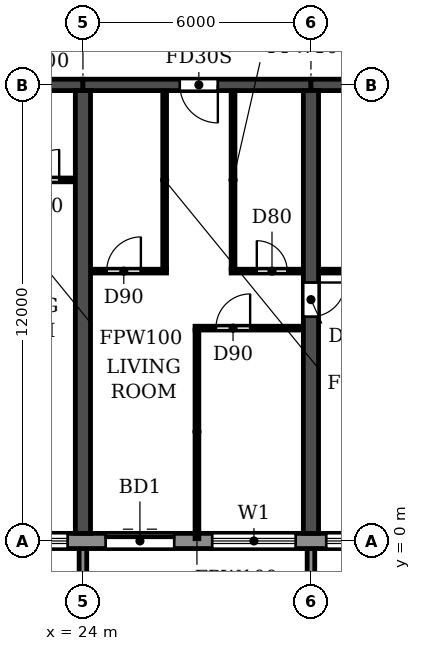
"""IFC4 building model, lengths in metres.
Left out: names, types, materials, properties, quantities, classifications, styles, units other than length and angle.
Written with IfcOpenShell. Run it as: python <this file> out.ifc"""

import sys

from ifc_helpers import new_model, si_unit, direction, frame, frame_2d, origin, place, context, subcontext, project, spatial, polyline, rectangle, outline, extrude, source, transform, mapped, element, fill, save


model = new_model("IFC4")
c1 = context("Model", 3, precision=1e-05, world=origin(), true_north=direction((0.0, 1.0)))
c2 = subcontext(c1, "Body", "Model", "MODEL_VIEW")
j1 = project(units=[si_unit("LENGTHUNIT", "METRE"), si_unit("PLANEANGLEUNIT", "RADIAN")], contexts=[c1])
p1 = place(None, origin())
s1 = spatial("IfcSite", under=j1, at=p1, CompositionType="ELEMENT")
p2 = place(p1, origin())
s2 = spatial("IfcBuilding", under=s1, at=p2, CompositionType="ELEMENT")
p3 = place(p2, frame((0.0, 0.0, 23.4)))
s3 = spatial("IfcBuildingStorey", under=s2, at=p3, CompositionType="ELEMENT", Elevation=23.4)
p4 = place(p3, frame((24.0, 0.2, 0.0), z_axis=(0.0, 0.0, 1.0), x_axis=(0.0, 1.0, 0.0)))
e1 = element("IfcWall", 1, at=p4, inside=s3, PredefinedType="SHEAR", context=c2, shape_type="SweptSolid", body=[
    extrude(rectangle(XDim=11.65, YDim=0.4, at=frame_2d((5.825, 0.0))), origin(), (0.0, 0.0, 1.0), 3.05),
])
p5 = place(p3, frame((30.0, 0.2, 0.0), z_axis=(0.0, 0.0, 1.0), x_axis=(0.0, 1.0, 0.0)))
e2 = element("IfcWall", 2, at=p5, inside=s3, PredefinedType="SHEAR", context=c2, shape_type="SweptSolid", body=[
    extrude(rectangle(XDim=11.65, YDim=0.4, at=frame_2d((5.825, 0.0))), origin(), (0.0, 0.0, 1.0), 3.05),
])
p6 = place(p5, frame((5.7, 0.0, 0.0)))
e3 = element("IfcOpeningElement", 3, at=p6, cuts=e2, PredefinedType="OPENING", context=c2, shape_type="SweptSolid", body=[
    extrude(rectangle(XDim=0.9, YDim=2.1, at=frame_2d((0.45, 1.05))), frame((0.0, 0.21, 0.0), z_axis=(0.0, -1.0, 0.0), x_axis=(1.0, 0.0, 0.0)), (0.0, 0.0, 1.0), 0.42),
])
p7 = place(p3, frame((18.0, 12.0, 0.0), z_axis=(0.0, 0.0, 1.0), x_axis=(1.0, 0.0, 0.0)))
e4 = element("IfcWall", 4, at=p7, inside=s3, PredefinedType="SHEAR", context=c2, shape_type="SweptSolid", body=[
    extrude(rectangle(XDim=6.0, YDim=0.3, at=frame_2d((3.0, 0.0))), origin(), (0.0, 0.0, 1.0), 2.45),
])
p8 = place(p7, frame((2.55, 0.0, 0.0)))
e5 = element("IfcOpeningElement", 5, at=p8, cuts=e4, PredefinedType="OPENING", context=c2, shape_type="SweptSolid", body=[
    extrude(rectangle(XDim=1.0, YDim=2.1, at=frame_2d((0.5, 1.05))), frame((0.0, 0.16, 0.0), z_axis=(0.0, -1.0, 0.0), x_axis=(1.0, 0.0, 0.0)), (0.0, 0.0, 1.0), 0.32),
])
p9 = place(p3, frame((24.0, 12.0, 0.0), z_axis=(0.0, 0.0, 1.0), x_axis=(1.0, 0.0, 0.0)))
e6 = element("IfcWall", 6, at=p9, inside=s3, PredefinedType="SHEAR", context=c2, shape_type="SweptSolid", body=[
    extrude(rectangle(XDim=6.0, YDim=0.3, at=frame_2d((3.0, 0.0))), origin(), (0.0, 0.0, 1.0), 2.45),
])
p10 = place(p9, frame((2.55, 0.0, 0.0)))
e7 = element("IfcOpeningElement", 7, at=p10, cuts=e6, PredefinedType="OPENING", context=c2, shape_type="SweptSolid", body=[
    extrude(rectangle(XDim=1.0, YDim=2.1, at=frame_2d((0.5, 1.05))), frame((0.0, 0.16, 0.0), z_axis=(0.0, -1.0, 0.0), x_axis=(1.0, 0.0, 0.0)), (0.0, 0.0, 1.0), 0.32),
])
p11 = place(p3, frame((30.0, 12.0, 0.0), z_axis=(0.0, 0.0, 1.0), x_axis=(1.0, 0.0, 0.0)))
e8 = element("IfcWall", 8, at=p11, inside=s3, PredefinedType="SHEAR", context=c2, shape_type="SweptSolid", body=[
    extrude(rectangle(XDim=6.0, YDim=0.3, at=frame_2d((3.0, 0.0))), origin(), (0.0, 0.0, 1.0), 2.45),
])
p12 = place(p3, frame((4.683, 0.0, 0.0), z_axis=(0.0, 0.0, 1.0), x_axis=(1.0, 0.0, 0.0)))
e9 = element("IfcWall", 9, at=p12, inside=s3, PredefinedType="STANDARD", context=c2, shape_type="SweptSolid", body=[
    extrude(rectangle(XDim=92.634, YDim=0.4, at=frame_2d((46.317, 0.0))), origin(), (0.0, 0.0, 1.0), 3.05),
])
p13 = place(p12, frame((1.717, 0.0, 0.9)))
e10 = element("IfcOpeningElement", 10, at=p13, cuts=e9, PredefinedType="OPENING", context=c2, shape_type="SweptSolid", body=[
    extrude(rectangle(XDim=2.2, YDim=1.5, at=frame_2d((1.1, 0.75))), frame((0.0, 0.21, 0.0), z_axis=(0.0, -1.0, 0.0), x_axis=(1.0, 0.0, 0.0)), (0.0, 0.0, 1.0), 0.42),
])
p14 = place(p12, frame((4.717, 0.0, 0.9)))
e11 = element("IfcOpeningElement", 11, at=p14, cuts=e9, PredefinedType="OPENING", context=c2, shape_type="SweptSolid", body=[
    extrude(rectangle(XDim=2.2, YDim=1.5, at=frame_2d((1.1, 0.75))), frame((0.0, 0.21, 0.0), z_axis=(0.0, -1.0, 0.0), x_axis=(1.0, 0.0, 0.0)), (0.0, 0.0, 1.0), 0.42),
])
p15 = place(p12, frame((7.717, 0.0, 0.9)))
e12 = element("IfcOpeningElement", 12, at=p15, cuts=e9, PredefinedType="OPENING", context=c2, shape_type="SweptSolid", body=[
    extrude(rectangle(XDim=2.2, YDim=1.5, at=frame_2d((1.1, 0.75))), frame((0.0, 0.21, 0.0), z_axis=(0.0, -1.0, 0.0), x_axis=(1.0, 0.0, 0.0)), (0.0, 0.0, 1.0), 0.42),
])
p16 = place(p12, frame((10.717, 0.0, 0.9)))
e13 = element("IfcOpeningElement", 13, at=p16, cuts=e9, PredefinedType="OPENING", context=c2, shape_type="SweptSolid", body=[
    extrude(rectangle(XDim=2.2, YDim=1.5, at=frame_2d((1.1, 0.75))), frame((0.0, 0.21, 0.0), z_axis=(0.0, -1.0, 0.0), x_axis=(1.0, 0.0, 0.0)), (0.0, 0.0, 1.0), 0.42),
])
p17 = place(p12, frame((13.717, 0.0, 0.9)))
e14 = element("IfcOpeningElement", 14, at=p17, cuts=e9, PredefinedType="OPENING", context=c2, shape_type="SweptSolid", body=[
    extrude(rectangle(XDim=2.2, YDim=1.5, at=frame_2d((1.1, 0.75))), frame((0.0, 0.21, 0.0), z_axis=(0.0, -1.0, 0.0), x_axis=(1.0, 0.0, 0.0)), (0.0, 0.0, 1.0), 0.42),
])
p18 = place(p12, frame((16.717, 0.0, 0.9)))
e15 = element("IfcOpeningElement", 15, at=p18, cuts=e9, PredefinedType="OPENING", context=c2, shape_type="SweptSolid", body=[
    extrude(rectangle(XDim=2.2, YDim=1.5, at=frame_2d((1.1, 0.75))), frame((0.0, 0.21, 0.0), z_axis=(0.0, -1.0, 0.0), x_axis=(1.0, 0.0, 0.0)), (0.0, 0.0, 1.0), 0.42),
])
p19 = place(p12, frame((19.917, 0.0, 0.0)))
e16 = element("IfcOpeningElement", 16, at=p19, cuts=e9, PredefinedType="OPENING", context=c2, shape_type="SweptSolid", body=[
    extrude(rectangle(XDim=1.8, YDim=2.4, at=frame_2d((0.9, 1.2))), frame((0.0, 0.21, 0.0), z_axis=(0.0, -1.0, 0.0), x_axis=(1.0, 0.0, 0.0)), (0.0, 0.0, 1.0), 0.42),
])
p20 = place(p12, frame((22.717, 0.0, 0.9)))
e17 = element("IfcOpeningElement", 17, at=p20, cuts=e9, PredefinedType="OPENING", context=c2, shape_type="SweptSolid", body=[
    extrude(rectangle(XDim=2.2, YDim=1.5, at=frame_2d((1.1, 0.75))), frame((0.0, 0.21, 0.0), z_axis=(0.0, -1.0, 0.0), x_axis=(1.0, 0.0, 0.0)), (0.0, 0.0, 1.0), 0.42),
])
p21 = place(p12, frame((25.717, 0.0, 0.9)))
e18 = element("IfcOpeningElement", 18, at=p21, cuts=e9, PredefinedType="OPENING", context=c2, shape_type="SweptSolid", body=[
    extrude(rectangle(XDim=2.2, YDim=1.5, at=frame_2d((1.1, 0.75))), frame((0.0, 0.21, 0.0), z_axis=(0.0, -1.0, 0.0), x_axis=(1.0, 0.0, 0.0)), (0.0, 0.0, 1.0), 0.42),
])
p22 = place(p12, frame((28.717, 0.0, 0.9)))
e19 = element("IfcOpeningElement", 19, at=p22, cuts=e9, PredefinedType="OPENING", context=c2, shape_type="SweptSolid", body=[
    extrude(rectangle(XDim=2.2, YDim=1.5, at=frame_2d((1.1, 0.75))), frame((0.0, 0.21, 0.0), z_axis=(0.0, -1.0, 0.0), x_axis=(1.0, 0.0, 0.0)), (0.0, 0.0, 1.0), 0.42),
])
p23 = place(p12, frame((31.917, 0.0, 0.0)))
e20 = element("IfcOpeningElement", 20, at=p23, cuts=e9, PredefinedType="OPENING", context=c2, shape_type="SweptSolid", body=[
    extrude(rectangle(XDim=1.8, YDim=2.4, at=frame_2d((0.9, 1.2))), frame((0.0, 0.21, 0.0), z_axis=(0.0, -1.0, 0.0), x_axis=(1.0, 0.0, 0.0)), (0.0, 0.0, 1.0), 0.42),
])
p24 = place(p12, frame((34.717, 0.0, 0.9)))
e21 = element("IfcOpeningElement", 21, at=p24, cuts=e9, PredefinedType="OPENING", context=c2, shape_type="SweptSolid", body=[
    extrude(rectangle(XDim=2.2, YDim=1.5, at=frame_2d((1.1, 0.75))), frame((0.0, 0.21, 0.0), z_axis=(0.0, -1.0, 0.0), x_axis=(1.0, 0.0, 0.0)), (0.0, 0.0, 1.0), 0.42),
])
p25 = place(p12, frame((37.717, 0.0, 0.9)))
e22 = element("IfcOpeningElement", 22, at=p25, cuts=e9, PredefinedType="OPENING", context=c2, shape_type="SweptSolid", body=[
    extrude(rectangle(XDim=2.2, YDim=1.5, at=frame_2d((1.1, 0.75))), frame((0.0, 0.21, 0.0), z_axis=(0.0, -1.0, 0.0), x_axis=(1.0, 0.0, 0.0)), (0.0, 0.0, 1.0), 0.42),
])
p26 = place(p12, frame((40.717, 0.0, 0.9)))
e23 = element("IfcOpeningElement", 23, at=p26, cuts=e9, PredefinedType="OPENING", context=c2, shape_type="SweptSolid", body=[
    extrude(rectangle(XDim=2.2, YDim=1.5, at=frame_2d((1.1, 0.75))), frame((0.0, 0.21, 0.0), z_axis=(0.0, -1.0, 0.0), x_axis=(1.0, 0.0, 0.0)), (0.0, 0.0, 1.0), 0.42),
])
p27 = place(p12, frame((43.917, 0.0, 0.0)))
e24 = element("IfcOpeningElement", 24, at=p27, cuts=e9, PredefinedType="OPENING", context=c2, shape_type="SweptSolid", body=[
    extrude(rectangle(XDim=1.8, YDim=2.4, at=frame_2d((0.9, 1.2))), frame((0.0, 0.21, 0.0), z_axis=(0.0, -1.0, 0.0), x_axis=(1.0, 0.0, 0.0)), (0.0, 0.0, 1.0), 0.42),
])
p28 = place(p12, frame((46.717, 0.0, 0.9)))
e25 = element("IfcOpeningElement", 25, at=p28, cuts=e9, PredefinedType="OPENING", context=c2, shape_type="SweptSolid", body=[
    extrude(rectangle(XDim=2.2, YDim=1.5, at=frame_2d((1.1, 0.75))), frame((0.0, 0.21, 0.0), z_axis=(0.0, -1.0, 0.0), x_axis=(1.0, 0.0, 0.0)), (0.0, 0.0, 1.0), 0.42),
])
p29 = place(p12, frame((49.717, 0.0, 0.9)))
e26 = element("IfcOpeningElement", 26, at=p29, cuts=e9, PredefinedType="OPENING", context=c2, shape_type="SweptSolid", body=[
    extrude(rectangle(XDim=2.2, YDim=1.5, at=frame_2d((1.1, 0.75))), frame((0.0, 0.21, 0.0), z_axis=(0.0, -1.0, 0.0), x_axis=(1.0, 0.0, 0.0)), (0.0, 0.0, 1.0), 0.42),
])
p30 = place(p12, frame((52.717, 0.0, 0.9)))
e27 = element("IfcOpeningElement", 27, at=p30, cuts=e9, PredefinedType="OPENING", context=c2, shape_type="SweptSolid", body=[
    extrude(rectangle(XDim=2.2, YDim=1.5, at=frame_2d((1.1, 0.75))), frame((0.0, 0.21, 0.0), z_axis=(0.0, -1.0, 0.0), x_axis=(1.0, 0.0, 0.0)), (0.0, 0.0, 1.0), 0.42),
])
p31 = place(p12, frame((55.717, 0.0, 0.9)))
e28 = element("IfcOpeningElement", 28, at=p31, cuts=e9, PredefinedType="OPENING", context=c2, shape_type="SweptSolid", body=[
    extrude(rectangle(XDim=2.2, YDim=1.5, at=frame_2d((1.1, 0.75))), frame((0.0, 0.21, 0.0), z_axis=(0.0, -1.0, 0.0), x_axis=(1.0, 0.0, 0.0)), (0.0, 0.0, 1.0), 0.42),
])
p32 = place(p12, frame((58.917, 0.0, 0.0)))
e29 = element("IfcOpeningElement", 29, at=p32, cuts=e9, PredefinedType="OPENING", context=c2, shape_type="SweptSolid", body=[
    extrude(rectangle(XDim=1.8, YDim=2.4, at=frame_2d((0.9, 1.2))), frame((0.0, 0.21, 0.0), z_axis=(0.0, -1.0, 0.0), x_axis=(1.0, 0.0, 0.0)), (0.0, 0.0, 1.0), 0.42),
])
p33 = place(p12, frame((61.717, 0.0, 0.9)))
e30 = element("IfcOpeningElement", 30, at=p33, cuts=e9, PredefinedType="OPENING", context=c2, shape_type="SweptSolid", body=[
    extrude(rectangle(XDim=2.2, YDim=1.5, at=frame_2d((1.1, 0.75))), frame((0.0, 0.21, 0.0), z_axis=(0.0, -1.0, 0.0), x_axis=(1.0, 0.0, 0.0)), (0.0, 0.0, 1.0), 0.42),
])
p34 = place(p12, frame((64.717, 0.0, 0.9)))
e31 = element("IfcOpeningElement", 31, at=p34, cuts=e9, PredefinedType="OPENING", context=c2, shape_type="SweptSolid", body=[
    extrude(rectangle(XDim=2.2, YDim=1.5, at=frame_2d((1.1, 0.75))), frame((0.0, 0.21, 0.0), z_axis=(0.0, -1.0, 0.0), x_axis=(1.0, 0.0, 0.0)), (0.0, 0.0, 1.0), 0.42),
])
p35 = place(p12, frame((67.717, 0.0, 0.9)))
e32 = element("IfcOpeningElement", 32, at=p35, cuts=e9, PredefinedType="OPENING", context=c2, shape_type="SweptSolid", body=[
    extrude(rectangle(XDim=2.2, YDim=1.5, at=frame_2d((1.1, 0.75))), frame((0.0, 0.21, 0.0), z_axis=(0.0, -1.0, 0.0), x_axis=(1.0, 0.0, 0.0)), (0.0, 0.0, 1.0), 0.42),
])
p36 = place(p12, frame((70.917, 0.0, 0.0)))
e33 = element("IfcOpeningElement", 33, at=p36, cuts=e9, PredefinedType="OPENING", context=c2, shape_type="SweptSolid", body=[
    extrude(rectangle(XDim=1.8, YDim=2.4, at=frame_2d((0.9, 1.2))), frame((0.0, 0.21, 0.0), z_axis=(0.0, -1.0, 0.0), x_axis=(1.0, 0.0, 0.0)), (0.0, 0.0, 1.0), 0.42),
])
p37 = place(p12, frame((73.717, 0.0, 0.9)))
e34 = element("IfcOpeningElement", 34, at=p37, cuts=e9, PredefinedType="OPENING", context=c2, shape_type="SweptSolid", body=[
    extrude(rectangle(XDim=2.2, YDim=1.5, at=frame_2d((1.1, 0.75))), frame((0.0, 0.21, 0.0), z_axis=(0.0, -1.0, 0.0), x_axis=(1.0, 0.0, 0.0)), (0.0, 0.0, 1.0), 0.42),
])
p38 = place(p12, frame((76.717, 0.0, 0.9)))
e35 = element("IfcOpeningElement", 35, at=p38, cuts=e9, PredefinedType="OPENING", context=c2, shape_type="SweptSolid", body=[
    extrude(rectangle(XDim=2.2, YDim=1.5, at=frame_2d((1.1, 0.75))), frame((0.0, 0.21, 0.0), z_axis=(0.0, -1.0, 0.0), x_axis=(1.0, 0.0, 0.0)), (0.0, 0.0, 1.0), 0.42),
])
p39 = place(p12, frame((79.717, 0.0, 0.9)))
e36 = element("IfcOpeningElement", 36, at=p39, cuts=e9, PredefinedType="OPENING", context=c2, shape_type="SweptSolid", body=[
    extrude(rectangle(XDim=2.2, YDim=1.5, at=frame_2d((1.1, 0.75))), frame((0.0, 0.21, 0.0), z_axis=(0.0, -1.0, 0.0), x_axis=(1.0, 0.0, 0.0)), (0.0, 0.0, 1.0), 0.42),
])
p40 = place(p12, frame((82.717, 0.0, 0.9)))
e37 = element("IfcOpeningElement", 37, at=p40, cuts=e9, PredefinedType="OPENING", context=c2, shape_type="SweptSolid", body=[
    extrude(rectangle(XDim=2.2, YDim=1.5, at=frame_2d((1.1, 0.75))), frame((0.0, 0.21, 0.0), z_axis=(0.0, -1.0, 0.0), x_axis=(1.0, 0.0, 0.0)), (0.0, 0.0, 1.0), 0.42),
])
p41 = place(p12, frame((85.717, 0.0, 0.9)))
e38 = element("IfcOpeningElement", 38, at=p41, cuts=e9, PredefinedType="OPENING", context=c2, shape_type="SweptSolid", body=[
    extrude(rectangle(XDim=2.2, YDim=1.5, at=frame_2d((1.1, 0.75))), frame((0.0, 0.21, 0.0), z_axis=(0.0, -1.0, 0.0), x_axis=(1.0, 0.0, 0.0)), (0.0, 0.0, 1.0), 0.42),
])
p42 = place(p12, frame((88.717, 0.0, 0.9)))
e39 = element("IfcOpeningElement", 39, at=p42, cuts=e9, PredefinedType="OPENING", context=c2, shape_type="SweptSolid", body=[
    extrude(rectangle(XDim=2.2, YDim=1.5, at=frame_2d((1.1, 0.75))), frame((0.0, 0.21, 0.0), z_axis=(0.0, -1.0, 0.0), x_axis=(1.0, 0.0, 0.0)), (0.0, 0.0, 1.0), 0.42),
])
m1 = source(origin(), c2, "Body", "SweptSolid", [
    extrude(outline(polyline([(0.0, 0.0), (0.2, 0.0), (0.2, 1.65), (0.0, 1.65), (0.0, 0.0)])), origin(), (0.0, 0.0, 1.0), 3.1),
])
for number, where in (
    (40, (23.9, -1.85, 0.0)),
    (41, (29.9, -1.85, 0.0)),
):
    element("IfcWall", number, at=place(p3, frame(where)), inside=s3, PredefinedType="STANDARD", context=c2, shape_type="MappedRepresentation", body=[
        mapped(m1, transform((0.0, 0.0, 0.0))),
    ])
p43 = place(p3, frame((26.95, 5.6, 0.0), z_axis=(0.0, 0.0, 1.0), x_axis=(1.0, 0.0, 0.0)))
e42 = element("IfcWall", 42, at=p43, inside=s3, PredefinedType="PARTITIONING", context=c2, shape_type="SweptSolid", body=[
    extrude(rectangle(XDim=2.84, YDim=0.1, at=frame_2d((1.42, 0.0))), origin(), (0.0, 0.0, 1.0), 3.05),
])
p44 = place(p43, frame((0.55, 0.0, 0.0)))
e43 = element("IfcOpeningElement", 43, at=p44, cuts=e42, PredefinedType="OPENING", context=c2, shape_type="SweptSolid", body=[
    extrude(rectangle(XDim=0.9, YDim=2.1, at=frame_2d((0.45, 1.05))), frame((0.0, 0.06, 0.0), z_axis=(0.0, -1.0, 0.0), x_axis=(1.0, 0.0, 0.0)), (0.0, 0.0, 1.0), 0.12),
])
p45 = place(p3, frame((24.21, 7.1, 0.0), z_axis=(0.0, 0.0, 1.0), x_axis=(1.0, 0.0, 0.0)))
e44 = element("IfcWall", 44, at=p45, inside=s3, PredefinedType="PARTITIONING", context=c2, shape_type="SweptSolid", body=[
    extrude(rectangle(XDim=1.99, YDim=0.1, at=frame_2d((0.995, 0.0))), origin(), (0.0, 0.0, 1.0), 3.05),
])
p46 = place(p45, frame((0.415, 0.0, 0.0)))
e45 = element("IfcOpeningElement", 45, at=p46, cuts=e44, PredefinedType="OPENING", context=c2, shape_type="SweptSolid", body=[
    extrude(rectangle(XDim=0.9, YDim=2.1, at=frame_2d((0.45, 1.05))), frame((0.0, 0.06, 0.0), z_axis=(0.0, -1.0, 0.0), x_axis=(1.0, 0.0, 0.0)), (0.0, 0.0, 1.0), 0.12),
])
p47 = place(p3, frame((27.9, 7.1, 0.0), z_axis=(0.0, 0.0, 1.0), x_axis=(1.0, 0.0, 0.0)))
e46 = element("IfcWall", 46, at=p47, inside=s3, PredefinedType="PARTITIONING", context=c2, shape_type="SweptSolid", body=[
    extrude(rectangle(XDim=1.89, YDim=0.1, at=frame_2d((0.945, 0.0))), origin(), (0.0, 0.0, 1.0), 3.05),
])
p48 = place(p47, frame((0.675, 0.0, 0.0)))
e47 = element("IfcOpeningElement", 47, at=p48, cuts=e46, PredefinedType="OPENING", context=c2, shape_type="SweptSolid", body=[
    extrude(rectangle(XDim=0.8, YDim=2.1, at=frame_2d((0.4, 1.05))), frame((0.0, 0.06, 0.0), z_axis=(0.0, -1.0, 0.0), x_axis=(1.0, 0.0, 0.0)), (0.0, 0.0, 1.0), 0.12),
])
p49 = place(p3, frame((30.21, 7.1, 0.0), z_axis=(0.0, 0.0, 1.0), x_axis=(1.0, 0.0, 0.0)))
e48 = element("IfcWall", 48, at=p49, inside=s3, PredefinedType="PARTITIONING", context=c2, shape_type="SweptSolid", body=[
    extrude(rectangle(XDim=2.69, YDim=0.1, at=frame_2d((1.345, 0.0))), origin(), (0.0, 0.0, 1.0), 3.05),
])
p50 = place(p49, frame((0.89, 0.0, 0.0)))
e49 = element("IfcOpeningElement", 49, at=p50, cuts=e48, PredefinedType="OPENING", context=c2, shape_type="SweptSolid", body=[
    extrude(rectangle(XDim=0.8, YDim=2.1, at=frame_2d((0.4, 1.05))), frame((0.0, 0.06, 0.0), z_axis=(0.0, -1.0, 0.0), x_axis=(1.0, 0.0, 0.0)), (0.0, 0.0, 1.0), 0.12),
])
p51 = place(p3, frame((21.9, 9.5, 0.0), z_axis=(0.0, 0.0, 1.0), x_axis=(1.0, 0.0, 0.0)))
e50 = element("IfcWall", 50, at=p51, inside=s3, PredefinedType="PARTITIONING", context=c2, shape_type="SweptSolid", body=[
    extrude(rectangle(XDim=1.89, YDim=0.1, at=frame_2d((0.945, 0.0))), origin(), (0.0, 0.0, 1.0), 3.05),
])
p52 = place(p51, frame((0.675, 0.0, 0.0)))
e51 = element("IfcOpeningElement", 51, at=p52, cuts=e50, PredefinedType="OPENING", context=c2, shape_type="SweptSolid", body=[
    extrude(rectangle(XDim=0.8, YDim=2.1, at=frame_2d((0.4, 1.05))), frame((0.0, 0.06, 0.0), z_axis=(0.0, -1.0, 0.0), x_axis=(1.0, 0.0, 0.0)), (0.0, 0.0, 1.0), 0.12),
])
p53 = place(p3, frame((26.15, 7.15, 0.0), z_axis=(0.0, 0.0, 1.0), x_axis=(0.0, 1.0, 0.0)))
e52 = element("IfcWall", 52, at=p53, inside=s3, PredefinedType="PARTITIONING", context=c2, shape_type="SweptSolid", body=[
    extrude(rectangle(XDim=4.69, YDim=0.1, at=frame_2d((2.345, 0.0))), origin(), (0.0, 0.0, 1.0), 3.05),
])
p54 = place(p3, frame((27.0, 0.06, 0.0), z_axis=(0.0, 0.0, 1.0), x_axis=(0.0, 1.0, 0.0)))
e53 = element("IfcWall", 53, at=p54, inside=s3, PredefinedType="PARTITIONING", context=c2, shape_type="SweptSolid", body=[
    extrude(rectangle(XDim=5.49, YDim=0.1, at=frame_2d((2.745, 0.0))), origin(), (0.0, 0.0, 1.0), 3.05),
])
p55 = place(p3, frame((27.95, 7.15, 0.0), z_axis=(0.0, 0.0, 1.0), x_axis=(0.0, 1.0, 0.0)))
e54 = element("IfcWall", 54, at=p55, inside=s3, PredefinedType="PARTITIONING", context=c2, shape_type="SweptSolid", body=[
    extrude(rectangle(XDim=4.69, YDim=0.1, at=frame_2d((2.345, 0.0))), origin(), (0.0, 0.0, 1.0), 3.05),
])
p56 = place(p18, origin())
e55 = element("IfcWindow", 55, at=p56, inside=s3, PartitioningType="DOUBLE_PANEL_HORIZONTAL", PredefinedType="WINDOW", context=c2, shape_type="SweptSolid", body=[
    extrude(rectangle(XDim=2.2, YDim=1.5, at=frame_2d((1.1, 0.75))), frame((0.0, 0.03, 0.0), z_axis=(0.0, -1.0, 0.0), x_axis=(1.0, 0.0, 0.0)), (0.0, 0.0, 1.0), 0.06),
])
fill(e15, e55)
p57 = place(p19, origin())
e56 = element("IfcDoor", 56, at=p57, inside=s3, OperationType="DOUBLE_DOOR_SLIDING", PredefinedType="DOOR", context=c2, shape_type="SweptSolid", body=[
    extrude(rectangle(XDim=1.8, YDim=2.4, at=frame_2d((0.9, 1.2))), frame((0.0, 0.025, 0.0), z_axis=(0.0, -1.0, 0.0), x_axis=(1.0, 0.0, 0.0)), (0.0, 0.0, 1.0), 0.05),
])
fill(e16, e56)
p58 = place(p20, origin())
e57 = element("IfcWindow", 57, at=p58, inside=s3, PartitioningType="DOUBLE_PANEL_HORIZONTAL", PredefinedType="WINDOW", context=c2, shape_type="SweptSolid", body=[
    extrude(rectangle(XDim=2.2, YDim=1.5, at=frame_2d((1.1, 0.75))), frame((0.0, 0.03, 0.0), z_axis=(0.0, -1.0, 0.0), x_axis=(1.0, 0.0, 0.0)), (0.0, 0.0, 1.0), 0.06),
])
fill(e17, e57)
p59 = place(p21, origin())
e58 = element("IfcWindow", 58, at=p59, inside=s3, PartitioningType="DOUBLE_PANEL_HORIZONTAL", PredefinedType="WINDOW", context=c2, shape_type="SweptSolid", body=[
    extrude(rectangle(XDim=2.2, YDim=1.5, at=frame_2d((1.1, 0.75))), frame((0.0, 0.03, 0.0), z_axis=(0.0, -1.0, 0.0), x_axis=(1.0, 0.0, 0.0)), (0.0, 0.0, 1.0), 0.06),
])
fill(e18, e58)
p60 = place(p52, origin())
e59 = element("IfcDoor", 59, at=p60, inside=s3, OperationType="SINGLE_SWING_RIGHT", PredefinedType="DOOR", context=c2, shape_type="SweptSolid", body=[
    extrude(rectangle(XDim=0.8, YDim=2.1, at=frame_2d((0.4, 1.05))), frame((0.0, 0.025, 0.0), z_axis=(0.0, -1.0, 0.0), x_axis=(1.0, 0.0, 0.0)), (0.0, 0.0, 1.0), 0.05),
])
fill(e51, e59)
p61 = place(p46, origin())
e60 = element("IfcDoor", 60, at=p61, inside=s3, OperationType="SINGLE_SWING_RIGHT", PredefinedType="DOOR", context=c2, shape_type="SweptSolid", body=[
    extrude(rectangle(XDim=0.9, YDim=2.1, at=frame_2d((0.45, 1.05))), frame((0.0, 0.025, 0.0), z_axis=(0.0, -1.0, 0.0), x_axis=(1.0, 0.0, 0.0)), (0.0, 0.0, 1.0), 0.05),
])
fill(e45, e60)
p62 = place(p10, frame((1.0, 0.0, 0.0), z_axis=(0.0, 0.0, 1.0), x_axis=(-1.0, 0.0, 0.0)))
e61 = element("IfcDoor", 61, at=p62, inside=s3, OperationType="SINGLE_SWING_LEFT", PredefinedType="DOOR", context=c2, shape_type="SweptSolid", body=[
    extrude(rectangle(XDim=1.0, YDim=2.1, at=frame_2d((0.5, 1.05))), frame((0.0, 0.025, 0.0), z_axis=(0.0, -1.0, 0.0), x_axis=(1.0, 0.0, 0.0)), (0.0, 0.0, 1.0), 0.05),
])
fill(e7, e61)
p63 = place(p44, origin())
e62 = element("IfcDoor", 62, at=p63, inside=s3, OperationType="SINGLE_SWING_RIGHT", PredefinedType="DOOR", context=c2, shape_type="SweptSolid", body=[
    extrude(rectangle(XDim=0.9, YDim=2.1, at=frame_2d((0.45, 1.05))), frame((0.0, 0.025, 0.0), z_axis=(0.0, -1.0, 0.0), x_axis=(1.0, 0.0, 0.0)), (0.0, 0.0, 1.0), 0.05),
])
fill(e43, e62)
p64 = place(p48, origin())
e63 = element("IfcDoor", 63, at=p64, inside=s3, OperationType="SINGLE_SWING_LEFT", PredefinedType="DOOR", context=c2, shape_type="SweptSolid", body=[
    extrude(rectangle(XDim=0.8, YDim=2.1, at=frame_2d((0.4, 1.05))), frame((0.0, 0.025, 0.0), z_axis=(0.0, -1.0, 0.0), x_axis=(1.0, 0.0, 0.0)), (0.0, 0.0, 1.0), 0.05),
])
fill(e47, e63)
p65 = place(p6, frame((0.9, 0.0, 0.0), z_axis=(0.0, 0.0, 1.0), x_axis=(-1.0, 0.0, 0.0)))
e64 = element("IfcDoor", 64, at=p65, inside=s3, OperationType="SINGLE_SWING_LEFT", PredefinedType="DOOR", context=c2, shape_type="SweptSolid", body=[
    extrude(rectangle(XDim=0.9, YDim=2.1, at=frame_2d((0.45, 1.05))), frame((0.0, 0.025, 0.0), z_axis=(0.0, -1.0, 0.0), x_axis=(1.0, 0.0, 0.0)), (0.0, 0.0, 1.0), 0.05),
])
fill(e3, e64)
save(model, sys.argv[1])
